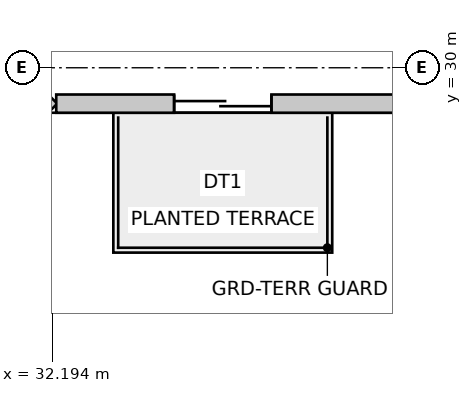
"""IFC4 building model, lengths in metres.
Left out: names, types, materials, properties, quantities, classifications, styles, units other than length and angle.
Written with IfcOpenShell. Run it as: python <this file> out.ifc"""

import sys

from ifc_helpers import new_model, si_unit, direction, frame, frame_2d, origin, place, context, subcontext, project, spatial, rectangle, extrude, source, transform, mapped, element, fill, save


model = new_model("IFC4")
c1 = context("Model", 3, precision=1e-05, world=origin(), true_north=direction((0.0, 1.0)))
c2 = subcontext(c1, "Body", "Model", "MODEL_VIEW")
j1 = project(units=[si_unit("LENGTHUNIT", "METRE"), si_unit("PLANEANGLEUNIT", "RADIAN")], contexts=[c1])
p1 = place(None, origin())
s1 = spatial("IfcSite", under=j1, at=p1, CompositionType="ELEMENT")
p2 = place(p1, origin())
s2 = spatial("IfcBuilding", under=s1, at=p2, CompositionType="ELEMENT")
p3 = place(p2, frame((0.0, 0.0, 39.0)))
s3 = spatial("IfcBuildingStorey", under=s2, at=p3, CompositionType="ELEMENT", Elevation=39.0)
p4 = place(p3, frame((30.116, 27.46, 0.0), z_axis=(0.0, 0.0, 1.0), x_axis=(0.707106781187, 0.707106781187, 0.0)))
e1 = element("IfcWall", 1, at=p4, inside=s3, PredefinedType="SOLIDWALL", context=c2, shape_type="SweptSolid", body=[
    extrude(rectangle(XDim=2.907, YDim=0.3, at=frame_2d((1.454, 0.0))), origin(), (0.0, 0.0, 1.0), 3.75),
])
m1 = source(origin(), c2, "Body", "SweptSolid", [
    extrude(rectangle(XDim=2.1, YDim=2.0, at=frame_2d((1.05, 1.0))), frame((0.0, 0.16, 0.0), z_axis=(0.0, -1.0, 0.0), x_axis=(1.0, 0.0, 0.0)), (0.0, 0.0, 1.0), 0.32),
])
p5 = place(p4, frame((0.404, 0.0, 0.85)))
e2 = element("IfcOpeningElement", 2, at=p5, cuts=e1, PredefinedType="OPENING", context=c2, shape_type="MappedRepresentation", body=[
    mapped(m1, transform((0.0, 0.0, 0.0), scale=1.0)),
])
p6 = place(p3, frame((32.261, 29.41, 0.0), z_axis=(0.0, 0.0, 1.0), x_axis=(1.0, 0.0, 0.0)))
e3 = element("IfcWall", 3, at=p6, inside=s3, PredefinedType="SOLIDWALL", context=c2, shape_type="SweptSolid", body=[
    extrude(rectangle(XDim=25.627, YDim=0.3, at=frame_2d((12.813, 0.0))), origin(), (0.0, 0.0, 1.0), 3.75),
])
m2 = source(origin(), c2, "Body", "SweptSolid", [
    extrude(rectangle(XDim=1.6, YDim=2.15, at=frame_2d((0.8, 1.075))), frame((0.0, 0.16, 0.0), z_axis=(0.0, -1.0, 0.0), x_axis=(1.0, 0.0, 0.0)), (0.0, 0.0, 1.0), 0.32),
])
p7 = place(p6, frame((1.939, 0.0, 0.0)))
e4 = element("IfcOpeningElement", 4, at=p7, cuts=e3, PredefinedType="OPENING", context=c2, shape_type="MappedRepresentation", body=[
    mapped(m2, transform((0.0, 0.0, 0.0), scale=1.0)),
])
m3 = source(origin(), c2, "Body", "SweptSolid", [
    extrude(rectangle(XDim=2.4, YDim=2.2, at=frame_2d((1.2, 1.1))), frame((0.0, 0.16, 0.0), z_axis=(0.0, -1.0, 0.0), x_axis=(1.0, 0.0, 0.0)), (0.0, 0.0, 1.0), 0.32),
])
p8 = place(p6, frame((6.2, 0.0, 0.85)))
e5 = element("IfcOpeningElement", 5, at=p8, cuts=e3, PredefinedType="OPENING", context=c2, shape_type="MappedRepresentation", body=[
    mapped(m3, transform((0.0, 0.0, 0.0), scale=1.0)),
])
m4 = source(origin(), c2, "Body", "SweptSolid", [
    extrude(rectangle(XDim=2.8, YDim=2.4, at=frame_2d((1.4, 1.2))), frame((0.0, 0.16, 0.0), z_axis=(0.0, -1.0, 0.0), x_axis=(1.0, 0.0, 0.0)), (0.0, 0.0, 1.0), 0.32),
])
p9 = place(p6, frame((13.163, 0.0, 0.85)))
e6 = element("IfcOpeningElement", 6, at=p9, cuts=e3, PredefinedType="OPENING", context=c2, shape_type="MappedRepresentation", body=[
    mapped(m4, transform((0.0, 0.0, 0.0), scale=1.0)),
])
p10 = place(p6, frame((20.526, 0.0, 0.85)))
e7 = element("IfcOpeningElement", 7, at=p10, cuts=e3, PredefinedType="OPENING", context=c2, shape_type="MappedRepresentation", body=[
    mapped(m3, transform((0.0, 0.0, 0.0), scale=1.0)),
])
m5 = source(origin(), c2, "Body", "SweptSolid", [
    extrude(rectangle(XDim=1.6, YDim=2.15, at=frame_2d((0.8, 1.075))), frame((0.0, 0.025, 0.0), z_axis=(0.0, -1.0, 0.0), x_axis=(1.0, 0.0, 0.0)), (0.0, 0.0, 1.0), 0.05),
])
p11 = place(p7, origin())
e8 = element("IfcDoor", 8, at=p11, inside=s3, OperationType="DOUBLE_DOOR_SLIDING", PredefinedType="DOOR", context=c2, shape_type="MappedRepresentation", body=[
    mapped(m5, transform((0.0, 0.0, 0.0), scale=1.0)),
])
fill(e4, e8)
save(model, sys.argv[1])
